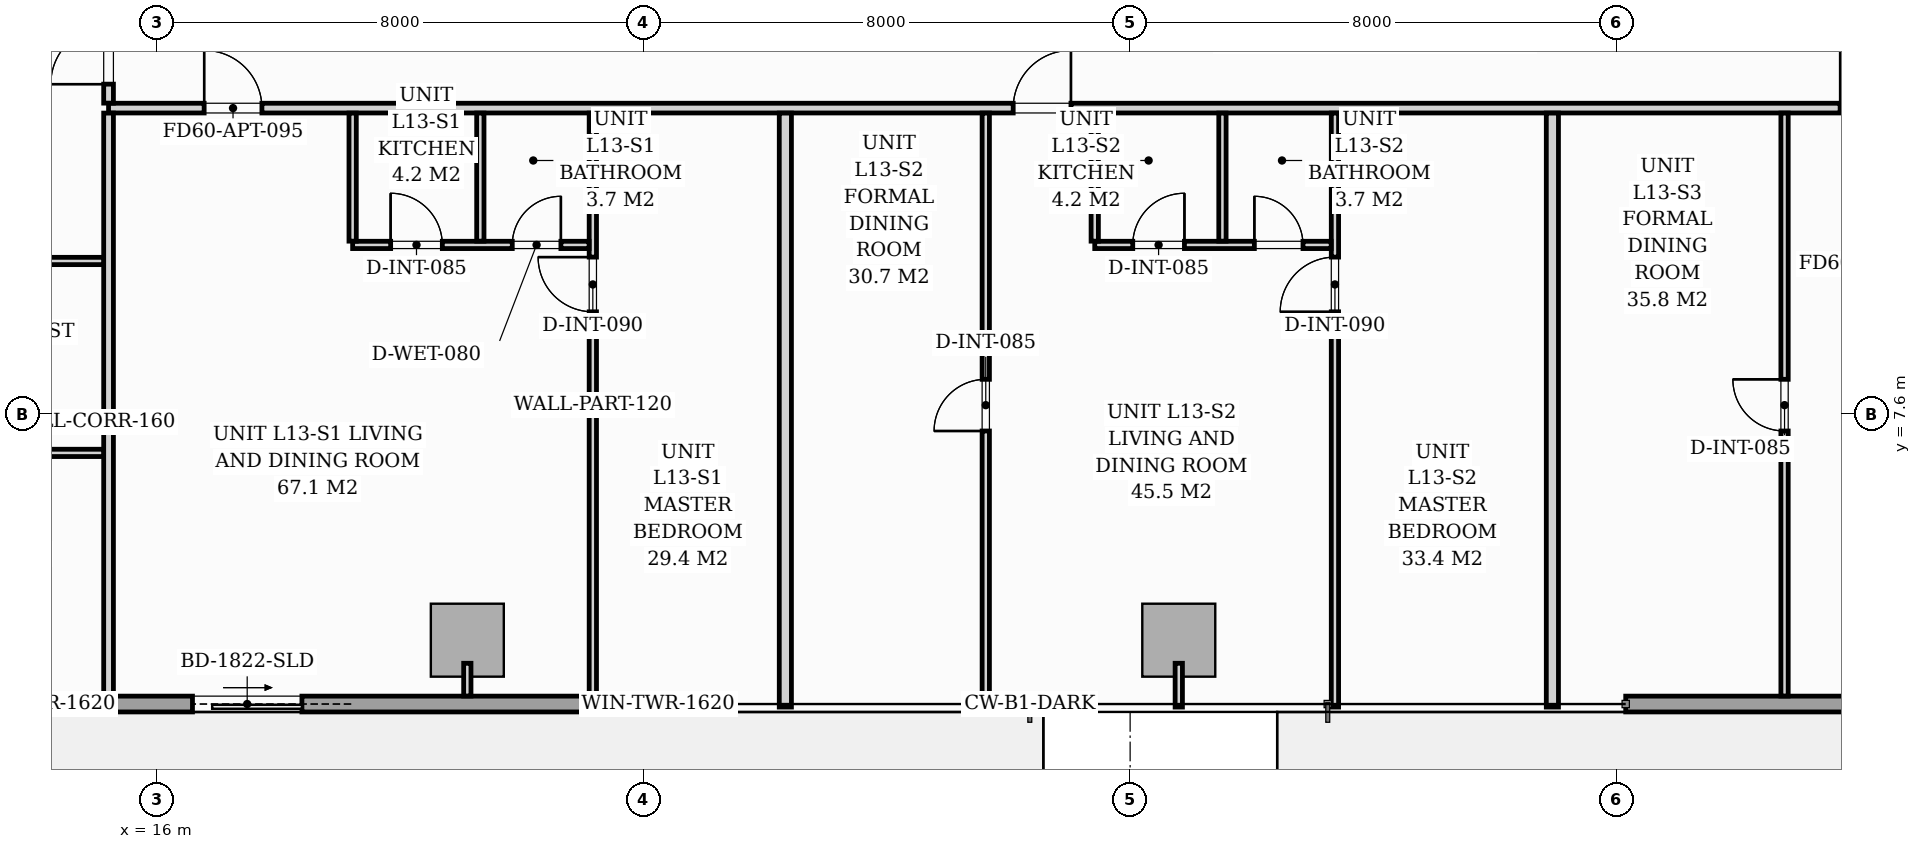
"""IFC4 building model, lengths in metres.
Left out: names, types, materials, properties, quantities, classifications, styles, units other than length and angle.
Written with IfcOpenShell. Run it as: python <this file> out.ifc"""

import sys

from ifc_helpers import new_model, si_unit, direction, frame, frame_2d, origin, origin_2d, place, context, subcontext, project, spatial, rectangle, extrude, source, transform, mapped, element, fill, save


model = new_model("IFC4")
c1 = context("Model", 3, precision=1e-05, world=origin(), true_north=direction((0.0, 1.0)))
c2 = subcontext(c1, "Body", "Model", "MODEL_VIEW")
j1 = project(units=[si_unit("LENGTHUNIT", "METRE"), si_unit("PLANEANGLEUNIT", "RADIAN")], contexts=[c1])
p1 = place(None, origin())
s1 = spatial("IfcSite", under=j1, at=p1, CompositionType="ELEMENT")
p2 = place(p1, origin())
s2 = spatial("IfcBuilding", under=s1, at=p2, CompositionType="ELEMENT")
p3 = place(p2, frame((0.0, 0.0, 48.6)))
s3 = spatial("IfcBuildingStorey", under=s2, at=p3, CompositionType="ELEMENT", Elevation=48.6)
m1 = source(origin(), c2, "Body", "SweptSolid", [
    extrude(rectangle(XDim=1.2, YDim=1.2, at=origin_2d()), origin(), (0.0, 0.0, 1.0), 3.196),
])
for number, where, z_axis, x_axis in (
    (1, (21.1, 3.88, 0.002), (0.0, 0.0, 1.0), (1.0, 0.0, 0.0)),
    (2, (32.8, 3.88, 0.002), (0.0, 0.0, 1.0), (1.0, 0.0, 0.0)),
):
    element("IfcColumn", number, at=place(p3, frame(where, z_axis=z_axis, x_axis=x_axis)), inside=s3, PredefinedType="COLUMN", context=c2, shape_type="MappedRepresentation", body=[
        mapped(m1, transform((0.0, 0.0, 0.0), scale=1.0)),
    ])
p4 = place(p3, frame((57.3, 2.83, 0.0), z_axis=(0.0, 0.0, 1.0), x_axis=(-1.0, 0.0, 0.0)))
e3 = element("IfcWall", 3, at=p4, inside=s3, PredefinedType="STANDARD", context=c2, shape_type="SweptSolid", body=[
    extrude(rectangle(XDim=17.15, YDim=0.26, at=frame_2d((8.575, 0.0))), origin(), (0.0, 0.0, 1.0), 2.94),
])
p5 = place(p4, frame((8.146, 0.0, 0.0)))
e4 = element("IfcOpeningElement", 4, at=p5, cuts=e3, PredefinedType="OPENING", context=c2, shape_type="SweptSolid", body=[
    extrude(rectangle(XDim=1.8, YDim=2.06, at=frame_2d((0.9, 1.03))), frame((0.0, 0.14, 0.0), z_axis=(0.0, -1.0, 0.0), x_axis=(1.0, 0.0, 0.0)), (0.0, 0.0, 1.0), 0.28),
])
p6 = place(p4, frame((2.05, 0.0, 0.65)))
e5 = element("IfcOpeningElement", 5, at=p6, cuts=e3, PredefinedType="OPENING", context=c2, shape_type="SweptSolid", body=[
    extrude(rectangle(XDim=1.6, YDim=1.5, at=frame_2d((0.8, 0.75))), frame((0.0, 0.14, 0.0), z_axis=(0.0, -1.0, 0.0), x_axis=(1.0, 0.0, 0.0)), (0.0, 0.0, 1.0), 0.28),
])
p7 = place(p4, frame((5.644, 0.0, 0.75)))
e6 = element("IfcOpeningElement", 6, at=p7, cuts=e3, PredefinedType="OPENING", context=c2, shape_type="SweptSolid", body=[
    extrude(rectangle(XDim=1.6, YDim=1.5, at=frame_2d((0.8, 0.75))), frame((0.0, 0.14, 0.0), z_axis=(0.0, -1.0, 0.0), x_axis=(1.0, 0.0, 0.0)), (0.0, 0.0, 1.0), 0.28),
])
p8 = place(p3, frame((25.45, 2.83, 0.0), z_axis=(0.0, 0.0, 1.0), x_axis=(-1.0, 0.0, 0.0)))
e7 = element("IfcWall", 7, at=p8, inside=s3, PredefinedType="STANDARD", context=c2, shape_type="SweptSolid", body=[
    extrude(rectangle(XDim=17.15, YDim=0.26, at=frame_2d((8.575, 0.0))), origin(), (0.0, 0.0, 1.0), 2.94),
])
p9 = place(p8, frame((7.07, 0.0, 0.0)))
e8 = element("IfcOpeningElement", 8, at=p9, cuts=e7, PredefinedType="OPENING", context=c2, shape_type="SweptSolid", body=[
    extrude(rectangle(XDim=1.8, YDim=2.06, at=frame_2d((0.9, 1.03))), frame((0.0, 0.14, 0.0), z_axis=(0.0, -1.0, 0.0), x_axis=(1.0, 0.0, 0.0)), (0.0, 0.0, 1.0), 0.28),
])
p10 = place(p8, frame((10.6, 0.0, 0.65)))
e9 = element("IfcOpeningElement", 9, at=p10, cuts=e7, PredefinedType="OPENING", context=c2, shape_type="SweptSolid", body=[
    extrude(rectangle(XDim=1.6, YDim=1.5, at=frame_2d((0.8, 0.75))), frame((0.0, 0.14, 0.0), z_axis=(0.0, -1.0, 0.0), x_axis=(1.0, 0.0, 0.0)), (0.0, 0.0, 1.0), 0.28),
])
p11 = place(p8, frame((0.413, 0.0, 0.75)))
e10 = element("IfcOpeningElement", 10, at=p11, cuts=e7, PredefinedType="OPENING", context=c2, shape_type="SweptSolid", body=[
    extrude(rectangle(XDim=1.6, YDim=1.5, at=frame_2d((0.8, 0.75))), frame((0.0, 0.14, 0.0), z_axis=(0.0, -1.0, 0.0), x_axis=(1.0, 0.0, 0.0)), (0.0, 0.0, 1.0), 0.28),
])
p12 = place(p3, frame((15.2, 12.63, 0.0), z_axis=(0.0, 0.0, 1.0), x_axis=(1.0, 0.0, 0.0)))
e11 = element("IfcWall", 11, at=p12, inside=s3, PredefinedType="PARTITIONING", context=c2, shape_type="SweptSolid", body=[
    extrude(rectangle(XDim=37.1, YDim=0.16, at=frame_2d((18.55, 0.0))), origin(), (0.0, 0.0, 1.0), 2.94),
])
p13 = place(p12, frame((1.572, 0.0, 0.0)))
e12 = element("IfcOpeningElement", 12, at=p13, cuts=e11, PredefinedType="OPENING", context=c2, shape_type="SweptSolid", body=[
    extrude(rectangle(XDim=0.95, YDim=2.06, at=frame_2d((0.475, 1.03))), frame((0.0, 0.09, 0.0), z_axis=(0.0, -1.0, 0.0), x_axis=(1.0, 0.0, 0.0)), (0.0, 0.0, 1.0), 0.18),
])
p14 = place(p12, frame((14.877, 0.0, 0.0)))
e13 = element("IfcOpeningElement", 13, at=p14, cuts=e11, PredefinedType="OPENING", context=c2, shape_type="SweptSolid", body=[
    extrude(rectangle(XDim=0.95, YDim=2.06, at=frame_2d((0.475, 1.03))), frame((0.0, 0.09, 0.0), z_axis=(0.0, -1.0, 0.0), x_axis=(1.0, 0.0, 0.0)), (0.0, 0.0, 1.0), 0.18),
])
p15 = place(p12, frame((28.476, 0.0, 0.0)))
e14 = element("IfcOpeningElement", 14, at=p15, cuts=e11, PredefinedType="OPENING", context=c2, shape_type="SweptSolid", body=[
    extrude(rectangle(XDim=0.95, YDim=2.06, at=frame_2d((0.475, 1.03))), frame((0.0, 0.09, 0.0), z_axis=(0.0, -1.0, 0.0), x_axis=(1.0, 0.0, 0.0)), (0.0, 0.0, 1.0), 0.18),
])
p16 = place(p3, frame((15.2, 2.962, 0.0), z_axis=(0.0, 0.0, 1.0), x_axis=(0.0, 1.0, 0.0)))
e15 = element("IfcWall", 15, at=p16, inside=s3, PredefinedType="PARTITIONING", context=c2, shape_type="SweptSolid", body=[
    extrude(rectangle(XDim=9.586, YDim=0.16, at=frame_2d((4.793, 0.0))), origin(), (0.0, 0.0, 1.0), 2.94),
])
p17 = place(p3, frame((15.2, 12.712, 0.0), z_axis=(0.0, 0.0, 1.0), x_axis=(0.0, 1.0, 0.0)))
e16 = element("IfcWall", 16, at=p17, inside=s3, PredefinedType="PARTITIONING", context=c2, shape_type="SweptSolid", body=[
    extrude(rectangle(XDim=14.726, YDim=0.16, at=frame_2d((7.363, 0.0))), origin(), (0.0, 0.0, 1.0), 2.94),
])
p18 = place(p17, frame((0.312, 0.0, 0.0)))
e17 = element("IfcOpeningElement", 17, at=p18, cuts=e16, PredefinedType="OPENING", context=c2, shape_type="SweptSolid", body=[
    extrude(rectangle(XDim=0.95, YDim=2.06, at=frame_2d((0.475, 1.03))), frame((0.0, 0.09, 0.0), z_axis=(0.0, -1.0, 0.0), x_axis=(1.0, 0.0, 0.0)), (0.0, 0.0, 1.0), 0.18),
])
p19 = place(p3, frame((23.164, 2.962, 0.0), z_axis=(0.0, 0.0, 1.0), x_axis=(0.0, 1.0, 0.0)))
e18 = element("IfcWall", 18, at=p19, inside=s3, PredefinedType="PARTITIONING", context=c2, shape_type="SweptSolid", body=[
    extrude(rectangle(XDim=9.586, YDim=0.12, at=frame_2d((4.793, 0.0))), origin(), (0.0, 0.0, 1.0), 2.94),
])
p20 = place(p19, frame((6.318, 0.0, 0.0)))
e19 = element("IfcOpeningElement", 19, at=p20, cuts=e18, PredefinedType="OPENING", context=c2, shape_type="SweptSolid", body=[
    extrude(rectangle(XDim=0.9, YDim=2.05, at=frame_2d((0.45, 1.025))), frame((0.0, 0.07, 0.0), z_axis=(0.0, -1.0, 0.0), x_axis=(1.0, 0.0, 0.0)), (0.0, 0.0, 1.0), 0.14),
])
p21 = place(p3, frame((19.214, 10.38, 0.0), z_axis=(0.0, 0.0, 1.0), x_axis=(1.0, 0.0, 0.0)))
e20 = element("IfcWall", 20, at=p21, inside=s3, PredefinedType="PARTITIONING", context=c2, shape_type="SweptSolid", body=[
    extrude(rectangle(XDim=3.888, YDim=0.12, at=frame_2d((1.944, 0.0))), origin(), (0.0, 0.0, 1.0), 2.94),
])
p22 = place(p21, frame((0.625, 0.0, 0.0)))
e21 = element("IfcOpeningElement", 21, at=p22, cuts=e20, PredefinedType="OPENING", context=c2, shape_type="SweptSolid", body=[
    extrude(rectangle(XDim=0.85, YDim=2.05, at=frame_2d((0.425, 1.025))), frame((0.0, 0.07, 0.0), z_axis=(0.0, -1.0, 0.0), x_axis=(1.0, 0.0, 0.0)), (0.0, 0.0, 1.0), 0.14),
])
p23 = place(p21, frame((2.625, 0.0, 0.0)))
e22 = element("IfcOpeningElement", 22, at=p23, cuts=e20, PredefinedType="OPENING", context=c2, shape_type="SweptSolid", body=[
    extrude(rectangle(XDim=0.8, YDim=2.02, at=frame_2d((0.4, 1.01))), frame((0.0, 0.07, 0.0), z_axis=(0.0, -1.0, 0.0), x_axis=(1.0, 0.0, 0.0)), (0.0, 0.0, 1.0), 0.14),
])
for number, where, z_axis, x_axis in (
    (23, (21.314, 10.442, 0.0), (0.0, 0.0, 1.0), (0.0, 1.0, 0.0)),
    (24, (19.214, 10.442, 0.0), (0.0, 0.0, 1.0), (0.0, 1.0, 0.0)),
):
    element("IfcWall", number, at=place(p3, frame(where, z_axis=z_axis, x_axis=x_axis)), inside=s3, PredefinedType="PARTITIONING", context=c2, shape_type="SweptSolid", body=[
        extrude(rectangle(XDim=2.106, YDim=0.12, at=frame_2d((1.053, 0.0))), origin(), (0.0, 0.0, 1.0), 2.94),
    ])
p24 = place(p3, frame((26.33, 2.78, 0.0), z_axis=(0.0, 0.0, 1.0), x_axis=(0.0, 1.0, 0.0)))
e25 = element("IfcWall", 25, at=p24, inside=s3, PredefinedType="PARTITIONING", context=c2, shape_type="SweptSolid", body=[
    extrude(rectangle(XDim=9.768, YDim=0.2, at=frame_2d((4.884, 0.0))), origin(), (0.0, 0.0, 1.0), 2.94),
])
p25 = place(p3, frame((35.368, 2.78, 0.0), z_axis=(0.0, 0.0, 1.0), x_axis=(0.0, 1.0, 0.0)))
e26 = element("IfcWall", 26, at=p25, inside=s3, PredefinedType="PARTITIONING", context=c2, shape_type="SweptSolid", body=[
    extrude(rectangle(XDim=9.768, YDim=0.12, at=frame_2d((4.884, 0.0))), origin(), (0.0, 0.0, 1.0), 2.94),
])
p26 = place(p25, frame((6.5, 0.0, 0.0)))
e27 = element("IfcOpeningElement", 27, at=p26, cuts=e26, PredefinedType="OPENING", context=c2, shape_type="SweptSolid", body=[
    extrude(rectangle(XDim=0.9, YDim=2.05, at=frame_2d((0.45, 1.025))), frame((0.0, 0.07, 0.0), z_axis=(0.0, -1.0, 0.0), x_axis=(1.0, 0.0, 0.0)), (0.0, 0.0, 1.0), 0.14),
])
p27 = place(p3, frame((31.418, 10.38, 0.0), z_axis=(0.0, 0.0, 1.0), x_axis=(1.0, 0.0, 0.0)))
e28 = element("IfcWall", 28, at=p27, inside=s3, PredefinedType="PARTITIONING", context=c2, shape_type="SweptSolid", body=[
    extrude(rectangle(XDim=3.888, YDim=0.12, at=frame_2d((1.944, 0.0))), origin(), (0.0, 0.0, 1.0), 2.94),
])
p28 = place(p27, frame((0.625, 0.0, 0.0)))
e29 = element("IfcOpeningElement", 29, at=p28, cuts=e28, PredefinedType="OPENING", context=c2, shape_type="SweptSolid", body=[
    extrude(rectangle(XDim=0.85, YDim=2.05, at=frame_2d((0.425, 1.025))), frame((0.0, 0.07, 0.0), z_axis=(0.0, -1.0, 0.0), x_axis=(1.0, 0.0, 0.0)), (0.0, 0.0, 1.0), 0.14),
])
p29 = place(p27, frame((2.625, 0.0, 0.0)))
e30 = element("IfcOpeningElement", 30, at=p29, cuts=e28, PredefinedType="OPENING", context=c2, shape_type="SweptSolid", body=[
    extrude(rectangle(XDim=0.8, YDim=2.02, at=frame_2d((0.4, 1.01))), frame((0.0, 0.07, 0.0), z_axis=(0.0, -1.0, 0.0), x_axis=(1.0, 0.0, 0.0)), (0.0, 0.0, 1.0), 0.14),
])
for number, where, z_axis, x_axis in (
    (31, (33.518, 10.442, 0.0), (0.0, 0.0, 1.0), (0.0, 1.0, 0.0)),
    (32, (31.418, 10.442, 0.0), (0.0, 0.0, 1.0), (0.0, 1.0, 0.0)),
):
    element("IfcWall", number, at=place(p3, frame(where, z_axis=z_axis, x_axis=x_axis)), inside=s3, PredefinedType="PARTITIONING", context=c2, shape_type="SweptSolid", body=[
        extrude(rectangle(XDim=2.106, YDim=0.12, at=frame_2d((1.053, 0.0))), origin(), (0.0, 0.0, 1.0), 2.94),
    ])
p30 = place(p3, frame((29.626, 2.78, 0.0), z_axis=(0.0, 0.0, 1.0), x_axis=(0.0, 1.0, 0.0)))
e33 = element("IfcWall", 33, at=p30, inside=s3, PredefinedType="PARTITIONING", context=c2, shape_type="SweptSolid", body=[
    extrude(rectangle(XDim=9.768, YDim=0.12, at=frame_2d((4.884, 0.0))), origin(), (0.0, 0.0, 1.0), 2.94),
])
p31 = place(p30, frame((4.54, 0.0, 0.0)))
e34 = element("IfcOpeningElement", 34, at=p31, cuts=e33, PredefinedType="OPENING", context=c2, shape_type="SweptSolid", body=[
    extrude(rectangle(XDim=0.85, YDim=2.05, at=frame_2d((0.425, 1.025))), frame((0.0, 0.07, 0.0), z_axis=(0.0, -1.0, 0.0), x_axis=(1.0, 0.0, 0.0)), (0.0, 0.0, 1.0), 0.14),
])
p32 = place(p3, frame((38.944, 2.78, 0.0), z_axis=(0.0, 0.0, 1.0), x_axis=(0.0, 1.0, 0.0)))
e35 = element("IfcWall", 35, at=p32, inside=s3, PredefinedType="PARTITIONING", context=c2, shape_type="SweptSolid", body=[
    extrude(rectangle(XDim=9.768, YDim=0.2, at=frame_2d((4.884, 0.0))), origin(), (0.0, 0.0, 1.0), 2.94),
])
p33 = place(p3, frame((42.762, 2.962, 0.0), z_axis=(0.0, 0.0, 1.0), x_axis=(0.0, 1.0, 0.0)))
e36 = element("IfcWall", 36, at=p33, inside=s3, PredefinedType="PARTITIONING", context=c2, shape_type="SweptSolid", body=[
    extrude(rectangle(XDim=9.586, YDim=0.12, at=frame_2d((4.793, 0.0))), origin(), (0.0, 0.0, 1.0), 2.94),
])
p34 = place(p33, frame((4.358, 0.0, 0.0)))
e37 = element("IfcOpeningElement", 37, at=p34, cuts=e36, PredefinedType="OPENING", context=c2, shape_type="SweptSolid", body=[
    extrude(rectangle(XDim=0.85, YDim=2.05, at=frame_2d((0.425, 1.025))), frame((0.0, 0.07, 0.0), z_axis=(0.0, -1.0, 0.0), x_axis=(1.0, 0.0, 0.0)), (0.0, 0.0, 1.0), 0.14),
])
p35 = place(p3, frame((5.88, 6.96, 0.0), z_axis=(0.0, 0.0, 1.0), x_axis=(1.0, 0.0, 0.0)))
e38 = element("IfcWall", 38, at=p35, inside=s3, PredefinedType="PARTITIONING", context=c2, shape_type="SweptSolid", body=[
    extrude(rectangle(XDim=9.238, YDim=0.12, at=frame_2d((4.619, 0.0))), origin(), (0.0, 0.0, 1.0), 2.94),
])
p36 = place(p35, frame((4.185, 0.0, 0.0)))
e39 = element("IfcOpeningElement", 39, at=p36, cuts=e38, PredefinedType="OPENING", context=c2, shape_type="SweptSolid", body=[
    extrude(rectangle(XDim=0.85, YDim=2.05, at=frame_2d((0.425, 1.025))), frame((0.0, 0.07, 0.0), z_axis=(0.0, -1.0, 0.0), x_axis=(1.0, 0.0, 0.0)), (0.0, 0.0, 1.0), 0.14),
])
p37 = place(p3, frame((5.88, 10.116, 0.0), z_axis=(0.0, 0.0, 1.0), x_axis=(1.0, 0.0, 0.0)))
e40 = element("IfcWall", 40, at=p37, inside=s3, PredefinedType="PARTITIONING", context=c2, shape_type="SweptSolid", body=[
    extrude(rectangle(XDim=9.238, YDim=0.12, at=frame_2d((4.619, 0.0))), origin(), (0.0, 0.0, 1.0), 2.94),
])
p38 = place(p37, frame((4.185, 0.0, 0.0)))
e41 = element("IfcOpeningElement", 41, at=p38, cuts=e40, PredefinedType="OPENING", context=c2, shape_type="SweptSolid", body=[
    extrude(rectangle(XDim=0.85, YDim=2.05, at=frame_2d((0.425, 1.025))), frame((0.0, 0.07, 0.0), z_axis=(0.0, -1.0, 0.0), x_axis=(1.0, 0.0, 0.0)), (0.0, 0.0, 1.0), 0.14),
])
p39 = place(p3, frame((21.1, 3.5, 0.0), z_axis=(0.0, 0.0, 1.0), x_axis=(0.0, -1.0, 0.0)))
e42 = element("IfcWall", 42, at=p39, inside=s3, PredefinedType="PARTITIONING", context=c2, shape_type="SweptSolid", body=[
    extrude(rectangle(XDim=0.538, YDim=0.12, at=frame_2d((0.269, 0.0))), origin(), (0.0, 0.0, 1.0), 2.94),
])
p40 = place(p3, frame((32.8, 3.5, 0.0), z_axis=(0.0, 0.0, 1.0), x_axis=(0.0, -1.0, 0.0)))
e43 = element("IfcWall", 43, at=p40, inside=s3, PredefinedType="PARTITIONING", context=c2, shape_type="SweptSolid", body=[
    extrude(rectangle(XDim=0.72, YDim=0.12, at=frame_2d((0.36, 0.0))), origin(), (0.0, 0.0, 1.0), 2.94),
])
m2 = source(origin(), c2, "Body", "SweptSolid", [
    extrude(rectangle(XDim=1.8, YDim=2.06, at=frame_2d((0.9, 1.03))), frame((0.0, 0.025, 0.0), z_axis=(0.0, -1.0, 0.0), x_axis=(1.0, 0.0, 0.0)), (0.0, 0.0, 1.0), 0.05),
])
p41 = place(p9, origin())
e44 = element("IfcDoor", 44, at=p41, inside=s3, OperationType="SLIDING_TO_LEFT", PredefinedType="DOOR", context=c2, shape_type="MappedRepresentation", body=[
    mapped(m2, transform((0.0, 0.0, 0.0), scale=1.0)),
])
fill(e8, e44)
m3 = source(origin(), c2, "Body", "SweptSolid", [
    extrude(rectangle(XDim=1.6, YDim=1.5, at=frame_2d((0.8, 0.75))), frame((0.0, 0.03, 0.0), z_axis=(0.0, -1.0, 0.0), x_axis=(1.0, 0.0, 0.0)), (0.0, 0.0, 1.0), 0.06),
])
p42 = place(p10, origin())
e45 = element("IfcWindow", 45, at=p42, inside=s3, PartitioningType="SINGLE_PANEL", PredefinedType="WINDOW", context=c2, shape_type="MappedRepresentation", body=[
    mapped(m3, transform((0.0, 0.0, 0.0), scale=1.0)),
])
fill(e9, e45)
p43 = place(p11, origin())
e46 = element("IfcWindow", 46, at=p43, inside=s3, PartitioningType="SINGLE_PANEL", PredefinedType="WINDOW", context=c2, shape_type="MappedRepresentation", body=[
    mapped(m3, transform((0.0, 0.0, 0.0), scale=1.0)),
])
fill(e10, e46)
m4 = source(origin(), c2, "Body", "SweptSolid", [
    extrude(rectangle(XDim=0.95, YDim=2.06, at=frame_2d((0.475, 1.03))), frame((0.0, 0.025, 0.0), z_axis=(0.0, -1.0, 0.0), x_axis=(1.0, 0.0, 0.0)), (0.0, 0.0, 1.0), 0.05),
])
p44 = place(p13, origin())
e47 = element("IfcDoor", 47, at=p44, inside=s3, OperationType="SINGLE_SWING_LEFT", PredefinedType="DOOR", context=c2, shape_type="MappedRepresentation", body=[
    mapped(m4, transform((0.0, 0.0, 0.0), scale=1.0)),
])
fill(e12, e47)
m5 = source(origin(), c2, "Body", "SweptSolid", [
    extrude(rectangle(XDim=0.9, YDim=2.05, at=frame_2d((0.45, 1.025))), frame((0.0, 0.025, 0.0), z_axis=(0.0, -1.0, 0.0), x_axis=(1.0, 0.0, 0.0)), (0.0, 0.0, 1.0), 0.05),
])
p45 = place(p20, origin())
e48 = element("IfcDoor", 48, at=p45, inside=s3, OperationType="SINGLE_SWING_RIGHT", PredefinedType="DOOR", context=c2, shape_type="MappedRepresentation", body=[
    mapped(m5, transform((0.0, 0.0, 0.0), scale=1.0)),
])
fill(e19, e48)
m6 = source(origin(), c2, "Body", "SweptSolid", [
    extrude(rectangle(XDim=0.85, YDim=2.05, at=frame_2d((0.425, 1.025))), frame((0.0, 0.025, 0.0), z_axis=(0.0, -1.0, 0.0), x_axis=(1.0, 0.0, 0.0)), (0.0, 0.0, 1.0), 0.05),
])
p46 = place(p22, origin())
e49 = element("IfcDoor", 49, at=p46, inside=s3, OperationType="SINGLE_SWING_LEFT", PredefinedType="DOOR", context=c2, shape_type="MappedRepresentation", body=[
    mapped(m6, transform((0.0, 0.0, 0.0), scale=1.0)),
])
fill(e21, e49)
m7 = source(origin(), c2, "Body", "SweptSolid", [
    extrude(rectangle(XDim=0.8, YDim=2.02, at=frame_2d((0.4, 1.01))), frame((0.0, 0.025, 0.0), z_axis=(0.0, -1.0, 0.0), x_axis=(1.0, 0.0, 0.0)), (0.0, 0.0, 1.0), 0.05),
])
p47 = place(p23, origin())
e50 = element("IfcDoor", 50, at=p47, inside=s3, OperationType="SINGLE_SWING_RIGHT", PredefinedType="DOOR", context=c2, shape_type="MappedRepresentation", body=[
    mapped(m7, transform((0.0, 0.0, 0.0), scale=1.0)),
])
fill(e22, e50)
p48 = place(p31, origin())
e51 = element("IfcDoor", 51, at=p48, inside=s3, OperationType="SINGLE_SWING_LEFT", PredefinedType="DOOR", context=c2, shape_type="MappedRepresentation", body=[
    mapped(m6, transform((0.0, 0.0, 0.0), scale=1.0)),
])
fill(e34, e51)
p49 = place(p14, origin())
e52 = element("IfcDoor", 52, at=p49, inside=s3, OperationType="SINGLE_SWING_RIGHT", PredefinedType="DOOR", context=c2, shape_type="MappedRepresentation", body=[
    mapped(m4, transform((0.0, 0.0, 0.0), scale=1.0)),
])
fill(e13, e52)
p50 = place(p26, origin())
e53 = element("IfcDoor", 53, at=p50, inside=s3, OperationType="SINGLE_SWING_LEFT", PredefinedType="DOOR", context=c2, shape_type="MappedRepresentation", body=[
    mapped(m5, transform((0.0, 0.0, 0.0), scale=1.0)),
])
fill(e27, e53)
p51 = place(p28, origin())
e54 = element("IfcDoor", 54, at=p51, inside=s3, OperationType="SINGLE_SWING_RIGHT", PredefinedType="DOOR", context=c2, shape_type="MappedRepresentation", body=[
    mapped(m6, transform((0.0, 0.0, 0.0), scale=1.0)),
])
fill(e29, e54)
p52 = place(p29, origin())
e55 = element("IfcDoor", 55, at=p52, inside=s3, OperationType="SINGLE_SWING_LEFT", PredefinedType="DOOR", context=c2, shape_type="MappedRepresentation", body=[
    mapped(m7, transform((0.0, 0.0, 0.0), scale=1.0)),
])
fill(e30, e55)
p53 = place(p34, origin())
e56 = element("IfcDoor", 56, at=p53, inside=s3, OperationType="SINGLE_SWING_RIGHT", PredefinedType="DOOR", context=c2, shape_type="MappedRepresentation", body=[
    mapped(m6, transform((0.0, 0.0, 0.0), scale=1.0)),
])
fill(e37, e56)
p54 = place(p15, origin())
e57 = element("IfcDoor", 57, at=p54, inside=s3, OperationType="SINGLE_SWING_LEFT", PredefinedType="DOOR", context=c2, shape_type="MappedRepresentation", body=[
    mapped(m4, transform((0.0, 0.0, 0.0), scale=1.0)),
])
fill(e14, e57)
p55 = place(p18, origin())
e58 = element("IfcDoor", 58, at=p55, inside=s3, OperationType="SINGLE_SWING_LEFT", PredefinedType="DOOR", context=c2, shape_type="MappedRepresentation", body=[
    mapped(m4, transform((0.0, 0.0, 0.0), scale=1.0)),
])
fill(e17, e58)
save(model, sys.argv[1])
